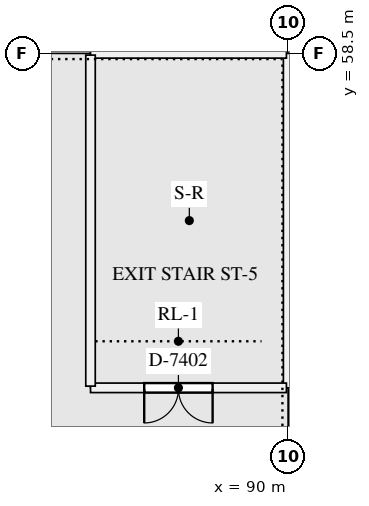
"""IFC4 building model, lengths in metres.
Left out: names, types, materials, properties, quantities, classifications, styles, units other than length and angle.
Written with IfcOpenShell. Run it as: python <this file> out.ifc"""

import sys

from ifc_helpers import new_model, si_unit, direction, frame, frame_2d, origin, place, context, subcontext, project, spatial, rectangle, extrude, element, fill, save


model = new_model("IFC4")
c1 = context("Model", 3, precision=1e-05, world=origin(), true_north=direction((0.0, 1.0)))
c2 = subcontext(c1, "Body", "Model", "MODEL_VIEW")
j1 = project(units=[si_unit("LENGTHUNIT", "METRE"), si_unit("PLANEANGLEUNIT", "RADIAN")], contexts=[c1])
p1 = place(None, origin())
s1 = spatial("IfcSite", under=j1, at=p1, CompositionType="ELEMENT")
p2 = place(p1, origin())
s2 = spatial("IfcBuilding", under=s1, at=p2, CompositionType="ELEMENT")
p3 = place(p2, frame((0.0, 0.0, 11.0)))
s3 = spatial("IfcBuildingStorey", under=s2, at=p3, CompositionType="ELEMENT", Elevation=11.0)
p4 = place(p3, frame((90.0, 49.7, 0.0), z_axis=(0.0, 0.0, 1.0), x_axis=(0.0, 1.0, 0.0)))
e1 = element("IfcWall", 1, at=p4, inside=s3, PredefinedType="SOLIDWALL", context=c2, shape_type="SweptSolid", body=[
    extrude(rectangle(XDim=8.8, YDim=0.25, at=frame_2d((4.4, 0.0))), origin(), (0.0, 0.0, 1.0), 3.9),
])
p5 = place(p3, frame((84.8, 58.5, 0.0), z_axis=(0.0, 0.0, 1.0), x_axis=(1.0, 0.0, 0.0)))
e2 = element("IfcWall", 2, at=p5, inside=s3, PredefinedType="SOLIDWALL", context=c2, shape_type="SweptSolid", body=[
    extrude(rectangle(XDim=5.155, YDim=0.25, at=frame_2d((2.578, 0.0))), origin(), (0.0, 0.0, 1.0), 3.9),
])
p6 = place(p3, frame((84.8, 49.7, 0.0), z_axis=(0.0, 0.0, 1.0), x_axis=(1.0, 0.0, 0.0)))
e3 = element("IfcWall", 3, at=p6, inside=s3, PredefinedType="SOLIDWALL", context=c2, shape_type="SweptSolid", body=[
    extrude(rectangle(XDim=5.155, YDim=0.25, at=frame_2d((2.578, 0.0))), origin(), (0.0, 0.0, 1.0), 3.9),
])
p7 = place(p6, frame((1.413, 0.0, 0.0)))
e4 = element("IfcOpeningElement", 4, at=p7, cuts=e3, PredefinedType="OPENING", context=c2, shape_type="SweptSolid", body=[
    extrude(rectangle(XDim=1.8, YDim=2.4, at=frame_2d((0.9, 1.2))), frame((0.0, 0.135, 0.0), z_axis=(0.0, -1.0, 0.0), x_axis=(1.0, 0.0, 0.0)), (0.0, 0.0, 1.0), 0.27),
])
p8 = place(p3, frame((84.8, 49.745, 0.0), z_axis=(0.0, 0.0, 1.0), x_axis=(0.0, 1.0, 0.0)))
e5 = element("IfcWall", 5, at=p8, inside=s3, PredefinedType="SOLIDWALL", context=c2, shape_type="SweptSolid", body=[
    extrude(rectangle(XDim=8.71, YDim=0.25, at=frame_2d((4.355, 0.0))), origin(), (0.0, 0.0, 1.0), 3.9),
])
p9 = place(p7, frame((1.8, 0.0, 0.0), z_axis=(0.0, 0.0, 1.0), x_axis=(-1.0, 0.0, 0.0)))
e6 = element("IfcDoor", 6, at=p9, inside=s3, OperationType="DOUBLE_DOOR_SINGLE_SWING", PredefinedType="DOOR", context=c2, shape_type="SweptSolid", body=[
    extrude(rectangle(XDim=1.8, YDim=2.4, at=frame_2d((0.9, 1.2))), frame((0.0, 0.025, 0.0), z_axis=(0.0, -1.0, 0.0), x_axis=(1.0, 0.0, 0.0)), (0.0, 0.0, 1.0), 0.05),
])
fill(e4, e6)
save(model, sys.argv[1])
